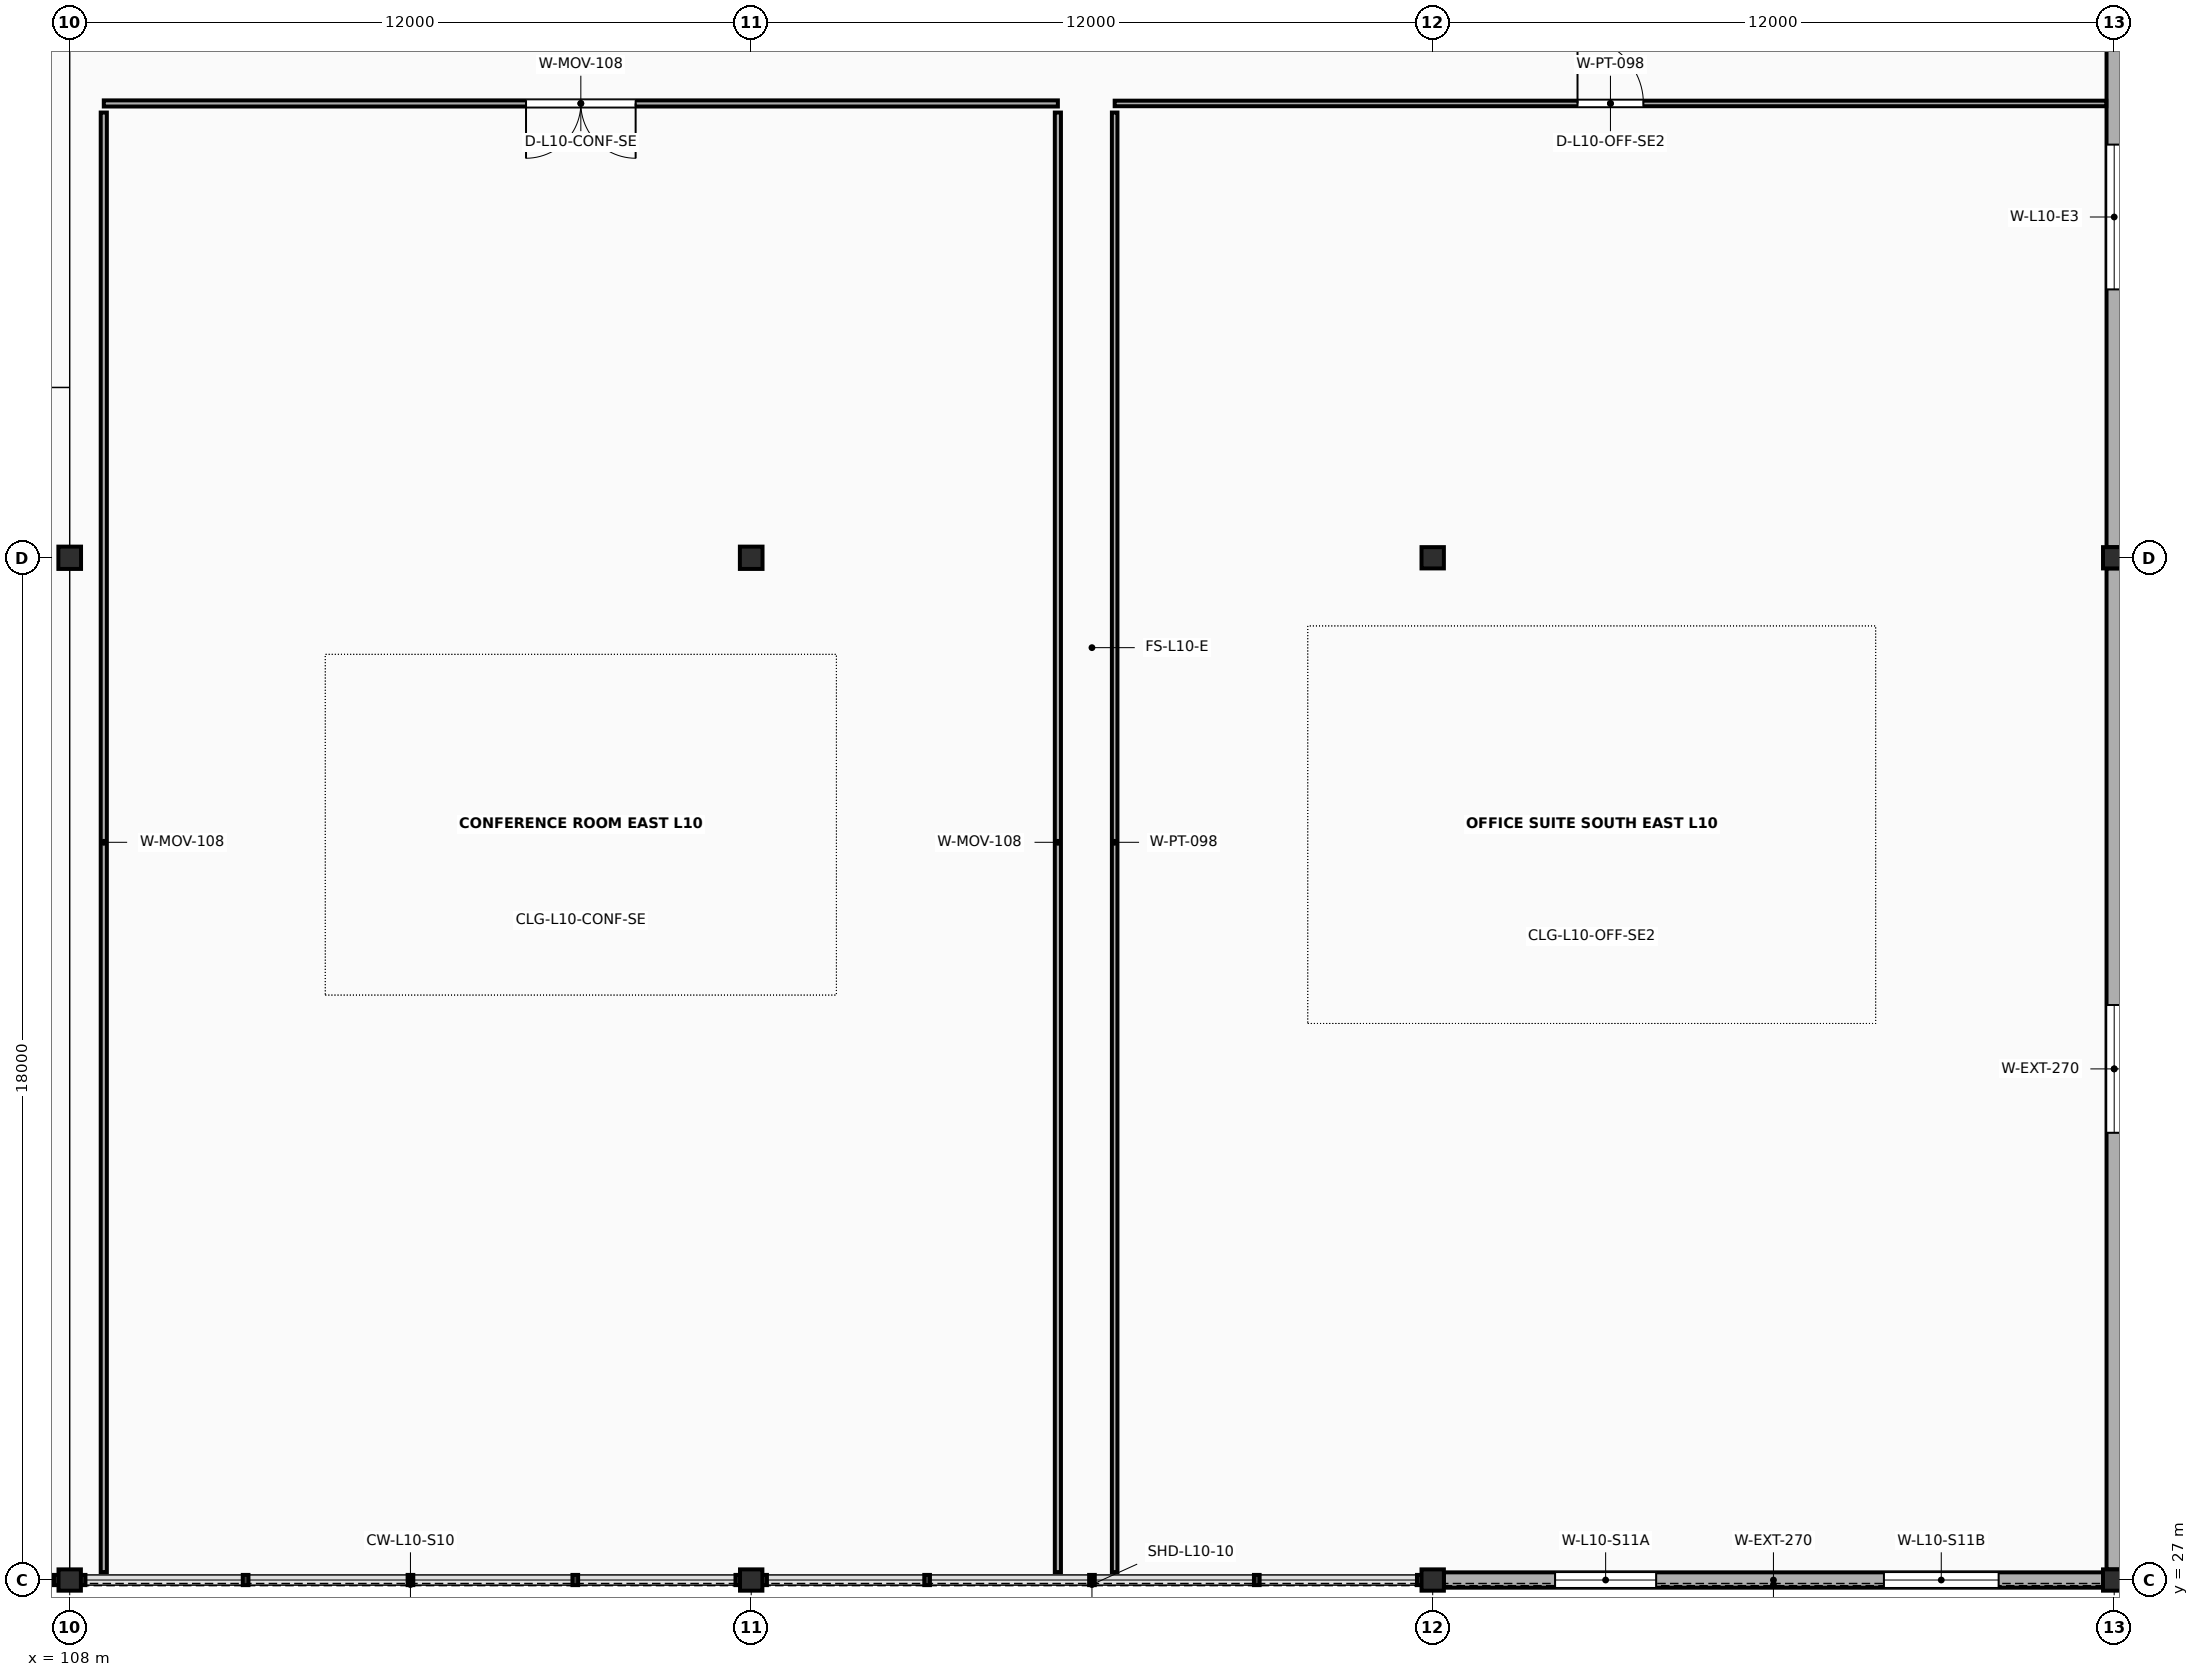
"""IFC4 building model, lengths in metres.
Left out: names, types, materials, properties, quantities, classifications, styles, units other than length and angle.
Written with IfcOpenShell. Run it as: python <this file> out.ifc"""

import sys

from ifc_helpers import new_model, si_unit, direction, frame, frame_2d, origin, origin_2d, place, context, subcontext, project, spatial, rectangle, i_section, extrude, element, fill, save


model = new_model("IFC4")
c1 = context("Model", 3, precision=1e-05, world=origin(), true_north=direction((0.0, 1.0)))
c2 = subcontext(c1, "Body", "Model", "MODEL_VIEW")
j1 = project(units=[si_unit("LENGTHUNIT", "METRE"), si_unit("PLANEANGLEUNIT", "RADIAN")], contexts=[c1])
p1 = place(None, origin())
s1 = spatial("IfcSite", under=j1, at=p1, CompositionType="ELEMENT")
p2 = place(p1, origin())
s2 = spatial("IfcBuilding", under=s1, at=p2, CompositionType="ELEMENT")
p3 = place(p2, frame((0.0, 0.0, 41.6)))
s3 = spatial("IfcBuildingStorey", under=s2, at=p3, CompositionType="ELEMENT", Elevation=41.6)
p4 = place(p3, frame((108.0, 27.0, 0.0), z_axis=(0.0, 0.0, 1.0), x_axis=(1.0, 0.0, 0.0)))
e1 = element("IfcColumn", 1, at=p4, inside=s3, PredefinedType="COLUMN", context=c2, shape_type="SweptSolid", body=[
    extrude(i_section(OverallWidth=0.394, OverallDepth=0.375, WebThickness=0.017, FlangeThickness=0.028, FilletRadius=0.018, at=origin_2d()), origin(), (0.0, 0.0, 1.0), 4.0),
])
p5 = place(p3, frame((108.0, 45.0, 0.0), z_axis=(0.0, 0.0, 1.0), x_axis=(1.0, 0.0, 0.0)))
e2 = element("IfcColumn", 2, at=p5, inside=s3, PredefinedType="COLUMN", context=c2, shape_type="SweptSolid", body=[
    extrude(i_section(OverallWidth=0.399, OverallDepth=0.393, WebThickness=0.023, FlangeThickness=0.037, FilletRadius=0.018, at=origin_2d()), origin(), (0.0, 0.0, 1.0), 4.0),
])
p6 = place(p3, frame((120.0, 27.0, 0.0), z_axis=(0.0, 0.0, 1.0), x_axis=(1.0, 0.0, 0.0)))
e3 = element("IfcColumn", 3, at=p6, inside=s3, PredefinedType="COLUMN", context=c2, shape_type="SweptSolid", body=[
    extrude(i_section(OverallWidth=0.394, OverallDepth=0.375, WebThickness=0.017, FlangeThickness=0.028, FilletRadius=0.018, at=origin_2d()), origin(), (0.0, 0.0, 1.0), 4.0),
])
p7 = place(p3, frame((120.0, 45.0, 0.0), z_axis=(0.0, 0.0, 1.0), x_axis=(1.0, 0.0, 0.0)))
e4 = element("IfcColumn", 4, at=p7, inside=s3, PredefinedType="COLUMN", context=c2, shape_type="SweptSolid", body=[
    extrude(i_section(OverallWidth=0.399, OverallDepth=0.393, WebThickness=0.023, FlangeThickness=0.037, FilletRadius=0.018, at=origin_2d()), origin(), (0.0, 0.0, 1.0), 4.0),
])
for number, where, z_axis, x_axis in (
    (5, (132.0, 27.0, 0.0), (0.0, 0.0, 1.0), (1.0, 0.0, 0.0)),
    (6, (132.0, 45.0, 0.0), (0.0, 0.0, 1.0), (1.0, 0.0, 0.0)),
    (7, (144.0, 27.0, 0.0), (0.0, 0.0, 1.0), (1.0, 0.0, 0.0)),
    (8, (144.0, 45.0, 0.0), (0.0, 0.0, 1.0), (1.0, 0.0, 0.0)),
):
    element("IfcColumn", number, at=place(p3, frame(where, z_axis=z_axis, x_axis=x_axis)), inside=s3, PredefinedType="COLUMN", context=c2, shape_type="SweptSolid", body=[
        extrude(i_section(OverallWidth=0.394, OverallDepth=0.375, WebThickness=0.017, FlangeThickness=0.028, FilletRadius=0.018, at=origin_2d()), origin(), (0.0, 0.0, 1.0), 4.0),
    ])
p8 = place(p3, frame((132.195, 27.0, 0.0), z_axis=(0.0, 0.0, 1.0), x_axis=(1.0, 0.0, 0.0)))
e9 = element("IfcWall", 9, at=p8, inside=s3, PredefinedType="SOLIDWALL", context=c2, shape_type="SweptSolid", body=[
    extrude(rectangle(XDim=11.61, YDim=0.27, at=frame_2d((5.805, 0.0))), origin(), (0.0, 0.0, 1.0), 3.281),
])
p9 = place(p8, frame((1.96, 0.0, 0.78)))
e10 = element("IfcOpeningElement", 10, at=p9, cuts=e9, PredefinedType="OPENING", context=c2, shape_type="SweptSolid", body=[
    extrude(rectangle(XDim=1.78, YDim=1.9, at=frame_2d((0.89, 0.95))), frame((0.0, 0.15, 0.0), z_axis=(0.0, -1.0, 0.0), x_axis=(1.0, 0.0, 0.0)), (0.0, 0.0, 1.0), 0.3),
])
p10 = place(p8, frame((7.75, 0.0, 0.78)))
e11 = element("IfcOpeningElement", 11, at=p10, cuts=e9, PredefinedType="OPENING", context=c2, shape_type="SweptSolid", body=[
    extrude(rectangle(XDim=2.02, YDim=1.9, at=frame_2d((1.01, 0.95))), frame((0.0, 0.15, 0.0), z_axis=(0.0, -1.0, 0.0), x_axis=(1.0, 0.0, 0.0)), (0.0, 0.0, 1.0), 0.3),
])
p11 = place(p3, frame((144.0, 27.186, 0.0), z_axis=(0.0, 0.0, 1.0), x_axis=(0.0, 1.0, 0.0)))
e12 = element("IfcWall", 12, at=p11, inside=s3, PredefinedType="SOLIDWALL", context=c2, shape_type="SweptSolid", body=[
    extrude(rectangle(XDim=17.629, YDim=0.27, at=frame_2d((8.814, 0.0))), origin(), (0.0, 0.0, 1.0), 3.281),
])
p12 = place(p11, frame((7.69, 0.0, 1.4)))
e13 = element("IfcOpeningElement", 13, at=p12, cuts=e12, PredefinedType="OPENING", context=c2, shape_type="SweptSolid", body=[
    extrude(rectangle(XDim=2.25, YDim=0.88, at=frame_2d((1.125, 0.44))), frame((0.0, 0.15, 0.0), z_axis=(0.0, -1.0, 0.0), x_axis=(1.0, 0.0, 0.0)), (0.0, 0.0, 1.0), 0.3),
])
p13 = place(p3, frame((144.0, 45.186, 0.0), z_axis=(0.0, 0.0, 1.0), x_axis=(0.0, 1.0, 0.0)))
e14 = element("IfcWall", 14, at=p13, inside=s3, PredefinedType="SOLIDWALL", context=c2, shape_type="SweptSolid", body=[
    extrude(rectangle(XDim=11.629, YDim=0.27, at=frame_2d((5.814, 0.0))), origin(), (0.0, 0.0, 1.0), 3.281),
])
p14 = place(p13, frame((4.54, 0.0, 1.4)))
e15 = element("IfcOpeningElement", 15, at=p14, cuts=e14, PredefinedType="OPENING", context=c2, shape_type="SweptSolid", body=[
    extrude(rectangle(XDim=2.55, YDim=0.88, at=frame_2d((1.275, 0.44))), frame((0.0, 0.15, 0.0), z_axis=(0.0, -1.0, 0.0), x_axis=(1.0, 0.0, 0.0)), (0.0, 0.0, 1.0), 0.3),
])
p15 = place(p3, frame((108.6, 53.0, 0.0), z_axis=(0.0, 0.0, 1.0), x_axis=(1.0, 0.0, 0.0)))
e16 = element("IfcWall", 16, at=p15, inside=s3, PredefinedType="MOVABLE", context=c2, shape_type="SweptSolid", body=[
    extrude(rectangle(XDim=16.8, YDim=0.108, at=frame_2d((8.4, 0.0))), origin(), (0.0, 0.0, 1.0), 2.88),
])
p16 = place(p15, frame((7.435, 0.0, 0.0)))
e17 = element("IfcOpeningElement", 17, at=p16, cuts=e16, PredefinedType="OPENING", context=c2, shape_type="SweptSolid", body=[
    extrude(rectangle(XDim=1.93, YDim=2.43, at=frame_2d((0.965, 1.215))), frame((0.0, 0.069, 0.0), z_axis=(0.0, -1.0, 0.0), x_axis=(1.0, 0.0, 0.0)), (0.0, 0.0, 1.0), 0.138),
])
for number, where, z_axis, x_axis in (
    (18, (108.6, 27.14, 0.0), (0.0, 0.0, 1.0), (0.0, 1.0, 0.0)),
    (19, (125.4, 27.14, 0.0), (0.0, 0.0, 1.0), (0.0, 1.0, 0.0)),
):
    element("IfcWall", number, at=place(p3, frame(where, z_axis=z_axis, x_axis=x_axis)), inside=s3, PredefinedType="MOVABLE", context=c2, shape_type="SweptSolid", body=[
        extrude(rectangle(XDim=25.7, YDim=0.108, at=frame_2d((12.85, 0.0))), origin(), (0.0, 0.0, 1.0), 2.88),
    ])
p17 = place(p3, frame((126.4, 53.0, 0.0), z_axis=(0.0, 0.0, 1.0), x_axis=(1.0, 0.0, 0.0)))
e20 = element("IfcWall", 20, at=p17, inside=s3, PredefinedType="PARTITIONING", context=c2, shape_type="SweptSolid", body=[
    extrude(rectangle(XDim=17.46, YDim=0.098, at=frame_2d((8.73, 0.0))), origin(), (0.0, 0.0, 1.0), 2.88),
])
p18 = place(p17, frame((8.15, 0.0, 0.0)))
e21 = element("IfcOpeningElement", 21, at=p18, cuts=e20, PredefinedType="OPENING", context=c2, shape_type="SweptSolid", body=[
    extrude(rectangle(XDim=1.16, YDim=2.23, at=frame_2d((0.58, 1.115))), frame((0.0, 0.064, 0.0), z_axis=(0.0, -1.0, 0.0), x_axis=(1.0, 0.0, 0.0)), (0.0, 0.0, 1.0), 0.128),
])
p19 = place(p3, frame((126.4, 27.14, 0.0), z_axis=(0.0, 0.0, 1.0), x_axis=(0.0, 1.0, 0.0)))
e22 = element("IfcWall", 22, at=p19, inside=s3, PredefinedType="PARTITIONING", context=c2, shape_type="SweptSolid", body=[
    extrude(rectangle(XDim=25.7, YDim=0.098, at=frame_2d((12.85, 0.0))), origin(), (0.0, 0.0, 1.0), 2.88),
])
p20 = place(p9, origin())
e23 = element("IfcWindow", 23, at=p20, inside=s3, PartitioningType="SINGLE_PANEL", PredefinedType="WINDOW", context=c2, shape_type="SweptSolid", body=[
    extrude(rectangle(XDim=1.78, YDim=1.9, at=frame_2d((0.89, 0.95))), frame((0.0, 0.03, 0.0), z_axis=(0.0, -1.0, 0.0), x_axis=(1.0, 0.0, 0.0)), (0.0, 0.0, 1.0), 0.06),
])
fill(e10, e23)
p21 = place(p10, origin())
e24 = element("IfcWindow", 24, at=p21, inside=s3, PartitioningType="DOUBLE_PANEL_VERTICAL", PredefinedType="WINDOW", context=c2, shape_type="SweptSolid", body=[
    extrude(rectangle(XDim=2.02, YDim=1.9, at=frame_2d((1.01, 0.95))), frame((0.0, 0.03, 0.0), z_axis=(0.0, -1.0, 0.0), x_axis=(1.0, 0.0, 0.0)), (0.0, 0.0, 1.0), 0.06),
])
fill(e11, e24)
p22 = place(p12, origin())
e25 = element("IfcWindow", 25, at=p22, inside=s3, PartitioningType="DOUBLE_PANEL_VERTICAL", PredefinedType="USERDEFINED", context=c2, shape_type="SweptSolid", body=[
    extrude(rectangle(XDim=2.25, YDim=0.88, at=frame_2d((1.125, 0.44))), frame((0.0, 0.03, 0.0), z_axis=(0.0, -1.0, 0.0), x_axis=(1.0, 0.0, 0.0)), (0.0, 0.0, 1.0), 0.06),
])
fill(e13, e25)
p23 = place(p14, origin())
e26 = element("IfcWindow", 26, at=p23, inside=s3, PartitioningType="DOUBLE_PANEL_VERTICAL", PredefinedType="USERDEFINED", context=c2, shape_type="SweptSolid", body=[
    extrude(rectangle(XDim=2.55, YDim=0.88, at=frame_2d((1.275, 0.44))), frame((0.0, 0.03, 0.0), z_axis=(0.0, -1.0, 0.0), x_axis=(1.0, 0.0, 0.0)), (0.0, 0.0, 1.0), 0.06),
])
fill(e15, e26)
p24 = place(p16, origin())
e27 = element("IfcDoor", 27, at=p24, inside=s3, OperationType="DOUBLE_DOOR_SINGLE_SWING", PredefinedType="DOOR", context=c2, shape_type="SweptSolid", body=[
    extrude(rectangle(XDim=1.93, YDim=2.43, at=frame_2d((0.965, 1.215))), frame((0.0, 0.025, 0.0), z_axis=(0.0, -1.0, 0.0), x_axis=(1.0, 0.0, 0.0)), (0.0, 0.0, 1.0), 0.05),
])
fill(e17, e27)
p25 = place(p18, origin())
e28 = element("IfcDoor", 28, at=p25, inside=s3, OperationType="SINGLE_SWING_LEFT", PredefinedType="DOOR", context=c2, shape_type="SweptSolid", body=[
    extrude(rectangle(XDim=1.16, YDim=2.23, at=frame_2d((0.58, 1.115))), frame((0.0, 0.025, 0.0), z_axis=(0.0, -1.0, 0.0), x_axis=(1.0, 0.0, 0.0)), (0.0, 0.0, 1.0), 0.05),
])
fill(e21, e28)
save(model, sys.argv[1])
